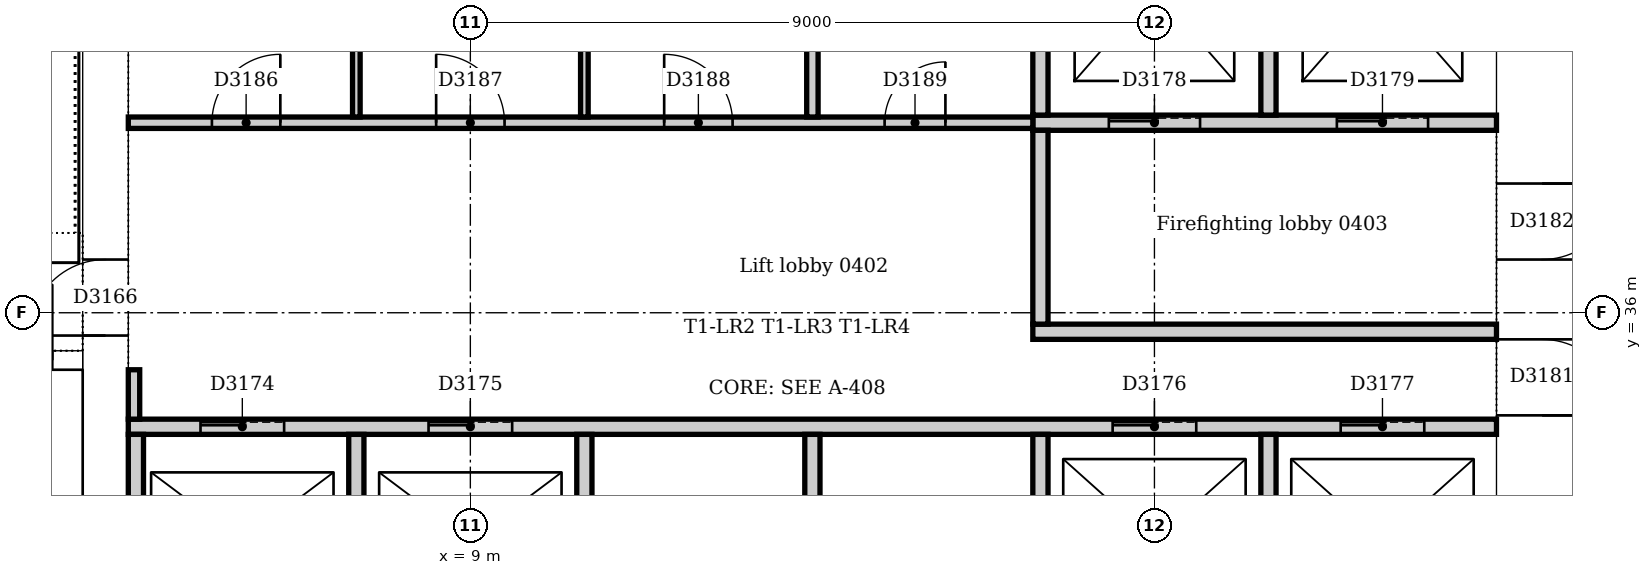
"""IFC4 building model, lengths in metres.
Left out: names, types, materials, properties, quantities, classifications, styles, units other than length and angle.
Written with IfcOpenShell. Run it as: python <this file> out.ifc"""

import sys

from ifc_helpers import new_model, si_unit, direction, frame, frame_2d, origin, place, context, subcontext, project, spatial, rectangle, extrude, element, fill, save


model = new_model("IFC4")
c1 = context("Model", 3, precision=1e-05, world=origin(), true_north=direction((0.0, 1.0)))
c2 = subcontext(c1, "Body", "Model", "MODEL_VIEW")
j1 = project(units=[si_unit("LENGTHUNIT", "METRE"), si_unit("PLANEANGLEUNIT", "RADIAN")], contexts=[c1])
p1 = place(None, origin())
s1 = spatial("IfcSite", under=j1, at=p1, CompositionType="ELEMENT")
p2 = place(p1, origin())
s2 = spatial("IfcBuilding", under=s1, at=p2, CompositionType="ELEMENT")
p3 = place(p2, frame((0.0, 0.0, 21.0)))
s3 = spatial("IfcBuildingStorey", under=s2, at=p3, CompositionType="ELEMENT", Elevation=21.0)
p4 = place(p3, frame((23.1, 31.5, 0.0), z_axis=(0.0, 0.0, 1.0), x_axis=(0.0, 1.0, 0.0)))
e1 = element("IfcWall", 1, at=p4, inside=s3, PredefinedType="SOLIDWALL", context=c2, shape_type="SweptSolid", body=[
    extrude(rectangle(XDim=10.5, YDim=1.2, at=frame_2d((5.25, 0.0))), origin(), (0.0, 0.0, 1.0), 5.0),
])
p5 = place(p4, frame((3.15, 0.0, 0.0)))
e2 = element("IfcOpeningElement", 2, at=p5, cuts=e1, PredefinedType="OPENING", context=c2, shape_type="SweptSolid", body=[
    extrude(rectangle(XDim=1.0, YDim=2.1, at=frame_2d((0.5, 1.05))), frame((0.0, 0.61, 0.0), z_axis=(0.0, -1.0, 0.0), x_axis=(1.0, 0.0, 0.0)), (0.0, 0.0, 1.0), 1.22),
])
p6 = place(p4, frame((5.2, 0.0, 0.0)))
e3 = element("IfcOpeningElement", 3, at=p6, cuts=e1, PredefinedType="OPENING", context=c2, shape_type="SweptSolid", body=[
    extrude(rectangle(XDim=1.0, YDim=2.1, at=frame_2d((0.5, 1.05))), frame((0.0, 0.61, 0.0), z_axis=(0.0, -1.0, 0.0), x_axis=(1.0, 0.0, 0.0)), (0.0, 0.0, 1.0), 1.22),
])
p7 = place(p3, frame((4.2, 42.0, 0.0), z_axis=(0.0, 0.0, 1.0), x_axis=(0.0, -1.0, 0.0)))
e4 = element("IfcWall", 4, at=p7, inside=s3, PredefinedType="SOLIDWALL", context=c2, shape_type="SweptSolid", body=[
    extrude(rectangle(XDim=10.5, YDim=0.6, at=frame_2d((5.25, 0.0))), origin(), (0.0, 0.0, 1.0), 5.0),
])
p8 = place(p7, frame((5.3, 0.0, 0.0)))
e5 = element("IfcOpeningElement", 5, at=p8, cuts=e4, PredefinedType="OPENING", context=c2, shape_type="SweptSolid", body=[
    extrude(rectangle(XDim=1.0, YDim=2.1, at=frame_2d((0.5, 1.05))), frame((0.0, 0.31, 0.0), z_axis=(0.0, -1.0, 0.0), x_axis=(1.0, 0.0, 0.0)), (0.0, 0.0, 1.0), 0.62),
])
p9 = place(p3, frame((0.36, 35.375, 0.0), z_axis=(0.0, 0.0, 1.0), x_axis=(1.0, 0.0, 0.0)))
e6 = element("IfcWall", 6, at=p9, inside=s3, PredefinedType="SOLIDWALL", context=c2, shape_type="SweptSolid", body=[
    extrude(rectangle(XDim=3.54, YDim=0.25, at=frame_2d((1.77, 0.0))), origin(), (0.0, 0.0, 1.0), 5.0),
])
p10 = place(p9, frame((2.14, 0.0, 0.0)))
e7 = element("IfcOpeningElement", 7, at=p10, cuts=e6, PredefinedType="OPENING", context=c2, shape_type="SweptSolid", body=[
    extrude(rectangle(XDim=1.0, YDim=2.1, at=frame_2d((0.5, 1.05))), frame((0.0, 0.135, 0.0), z_axis=(0.0, -1.0, 0.0), x_axis=(1.0, 0.0, 0.0)), (0.0, 0.0, 1.0), 0.27),
])
p11 = place(p3, frame((16.4, 35.75, 0.0), z_axis=(0.0, 0.0, 1.0), x_axis=(1.0, 0.0, 0.0)))
e8 = element("IfcWall", 8, at=p11, inside=s3, PredefinedType="PARTITIONING", context=c2, shape_type="SweptSolid", body=[
    extrude(rectangle(XDim=6.1, YDim=0.2, at=frame_2d((3.05, 0.0))), origin(), (0.0, 0.0, 1.0), 4.85),
])
p12 = place(p3, frame((16.4, 38.5, 0.0), z_axis=(0.0, 0.0, 1.0), x_axis=(1.0, 0.0, 0.0)))
e9 = element("IfcWall", 9, at=p12, inside=s3, PredefinedType="PARTITIONING", context=c2, shape_type="SweptSolid", body=[
    extrude(rectangle(XDim=6.1, YDim=0.2, at=frame_2d((3.05, 0.0))), origin(), (0.0, 0.0, 1.0), 4.85),
])
p13 = place(p12, frame((1.0, 0.0, 0.0)))
e10 = element("IfcOpeningElement", 10, at=p13, cuts=e9, PredefinedType="OPENING", context=c2, shape_type="SweptSolid", body=[
    extrude(rectangle(XDim=1.2, YDim=2.1, at=frame_2d((0.6, 1.05))), frame((0.0, 0.11, 0.0), z_axis=(0.0, -1.0, 0.0), x_axis=(1.0, 0.0, 0.0)), (0.0, 0.0, 1.0), 0.22),
])
p14 = place(p12, frame((4.0, 0.0, 0.0)))
e11 = element("IfcOpeningElement", 11, at=p14, cuts=e9, PredefinedType="OPENING", context=c2, shape_type="SweptSolid", body=[
    extrude(rectangle(XDim=1.2, YDim=2.1, at=frame_2d((0.6, 1.05))), frame((0.0, 0.11, 0.0), z_axis=(0.0, -1.0, 0.0), x_axis=(1.0, 0.0, 0.0)), (0.0, 0.0, 1.0), 0.22),
])
p15 = place(p3, frame((16.5, 35.85, 0.0), z_axis=(0.0, 0.0, 1.0), x_axis=(0.0, 1.0, 0.0)))
e12 = element("IfcWall", 12, at=p15, inside=s3, PredefinedType="PARTITIONING", context=c2, shape_type="SweptSolid", body=[
    extrude(rectangle(XDim=2.55, YDim=0.2, at=frame_2d((1.275, 0.0))), origin(), (0.0, 0.0, 1.0), 4.85),
])
p16 = place(p3, frame((4.5, 34.5, 0.0), z_axis=(0.0, 0.0, 1.0), x_axis=(1.0, 0.0, 0.0)))
e13 = element("IfcWall", 13, at=p16, inside=s3, PredefinedType="PARTITIONING", context=c2, shape_type="SweptSolid", body=[
    extrude(rectangle(XDim=18.0, YDim=0.2, at=frame_2d((9.0, 0.0))), origin(), (0.0, 0.0, 1.0), 4.85),
])
p17 = place(p16, frame((0.95, 0.0, 0.0)))
e14 = element("IfcOpeningElement", 14, at=p17, cuts=e13, PredefinedType="OPENING", context=c2, shape_type="SweptSolid", body=[
    extrude(rectangle(XDim=1.1, YDim=2.1, at=frame_2d((0.55, 1.05))), frame((0.0, 0.11, 0.0), z_axis=(0.0, -1.0, 0.0), x_axis=(1.0, 0.0, 0.0)), (0.0, 0.0, 1.0), 0.22),
])
p18 = place(p16, frame((3.95, 0.0, 0.0)))
e15 = element("IfcOpeningElement", 15, at=p18, cuts=e13, PredefinedType="OPENING", context=c2, shape_type="SweptSolid", body=[
    extrude(rectangle(XDim=1.1, YDim=2.1, at=frame_2d((0.55, 1.05))), frame((0.0, 0.11, 0.0), z_axis=(0.0, -1.0, 0.0), x_axis=(1.0, 0.0, 0.0)), (0.0, 0.0, 1.0), 0.22),
])
p19 = place(p16, frame((12.95, 0.0, 0.0)))
e16 = element("IfcOpeningElement", 16, at=p19, cuts=e13, PredefinedType="OPENING", context=c2, shape_type="SweptSolid", body=[
    extrude(rectangle(XDim=1.1, YDim=2.1, at=frame_2d((0.55, 1.05))), frame((0.0, 0.11, 0.0), z_axis=(0.0, -1.0, 0.0), x_axis=(1.0, 0.0, 0.0)), (0.0, 0.0, 1.0), 0.22),
])
p20 = place(p16, frame((15.95, 0.0, 0.0)))
e17 = element("IfcOpeningElement", 17, at=p20, cuts=e13, PredefinedType="OPENING", context=c2, shape_type="SweptSolid", body=[
    extrude(rectangle(XDim=1.1, YDim=2.1, at=frame_2d((0.55, 1.05))), frame((0.0, 0.11, 0.0), z_axis=(0.0, -1.0, 0.0), x_axis=(1.0, 0.0, 0.0)), (0.0, 0.0, 1.0), 0.22),
])
for number, where, z_axis, x_axis in (
    (18, (16.5, 38.6, 0.0), (0.0, 0.0, 1.0), (0.0, 1.0, 0.0)),
    (19, (19.5, 38.6, 0.0), (0.0, 0.0, 1.0), (0.0, 1.0, 0.0)),
):
    element("IfcWall", number, at=place(p3, frame(where, z_axis=z_axis, x_axis=x_axis)), inside=s3, PredefinedType="PARTITIONING", context=c2, shape_type="SweptSolid", body=[
        extrude(rectangle(XDim=3.4, YDim=0.2, at=frame_2d((1.7, 0.0))), origin(), (0.0, 0.0, 1.0), 4.85),
    ])
for number, where, z_axis, x_axis in (
    (20, (4.6, 31.75, 0.0), (0.0, 0.0, 1.0), (0.0, 1.0, 0.0)),
    (21, (7.5, 31.75, 0.0), (0.0, 0.0, 1.0), (0.0, 1.0, 0.0)),
    (22, (10.5, 31.75, 0.0), (0.0, 0.0, 1.0), (0.0, 1.0, 0.0)),
    (23, (13.5, 31.75, 0.0), (0.0, 0.0, 1.0), (0.0, 1.0, 0.0)),
    (24, (16.5, 31.75, 0.0), (0.0, 0.0, 1.0), (0.0, 1.0, 0.0)),
    (25, (19.5, 31.75, 0.0), (0.0, 0.0, 1.0), (0.0, 1.0, 0.0)),
):
    element("IfcWall", number, at=place(p3, frame(where, z_axis=z_axis, x_axis=x_axis)), inside=s3, PredefinedType="PARTITIONING", context=c2, shape_type="SweptSolid", body=[
        extrude(rectangle(XDim=2.65, YDim=0.2, at=frame_2d((1.325, 0.0))), origin(), (0.0, 0.0, 1.0), 4.85),
    ])
p21 = place(p3, frame((4.5, 38.5, 0.0), z_axis=(0.0, 0.0, 1.0), x_axis=(1.0, 0.0, 0.0)))
e26 = element("IfcWall", 26, at=p21, inside=s3, PredefinedType="PARTITIONING", context=c2, shape_type="SweptSolid", body=[
    extrude(rectangle(XDim=11.9, YDim=0.15, at=frame_2d((5.95, 0.0))), origin(), (0.0, 0.0, 1.0), 4.85),
])
p22 = place(p21, frame((1.1, 0.0, 0.0)))
e27 = element("IfcOpeningElement", 27, at=p22, cuts=e26, PredefinedType="OPENING", context=c2, shape_type="SweptSolid", body=[
    extrude(rectangle(XDim=0.9, YDim=2.1, at=frame_2d((0.45, 1.05))), frame((0.0, 0.085, 0.0), z_axis=(0.0, -1.0, 0.0), x_axis=(1.0, 0.0, 0.0)), (0.0, 0.0, 1.0), 0.17),
])
p23 = place(p21, frame((4.05, 0.0, 0.0)))
e28 = element("IfcOpeningElement", 28, at=p23, cuts=e26, PredefinedType="OPENING", context=c2, shape_type="SweptSolid", body=[
    extrude(rectangle(XDim=0.9, YDim=2.1, at=frame_2d((0.45, 1.05))), frame((0.0, 0.085, 0.0), z_axis=(0.0, -1.0, 0.0), x_axis=(1.0, 0.0, 0.0)), (0.0, 0.0, 1.0), 0.17),
])
p24 = place(p21, frame((7.05, 0.0, 0.0)))
e29 = element("IfcOpeningElement", 29, at=p24, cuts=e26, PredefinedType="OPENING", context=c2, shape_type="SweptSolid", body=[
    extrude(rectangle(XDim=0.9, YDim=2.1, at=frame_2d((0.45, 1.05))), frame((0.0, 0.085, 0.0), z_axis=(0.0, -1.0, 0.0), x_axis=(1.0, 0.0, 0.0)), (0.0, 0.0, 1.0), 0.17),
])
p25 = place(p21, frame((9.95, 0.0, 0.0)))
e30 = element("IfcOpeningElement", 30, at=p25, cuts=e26, PredefinedType="OPENING", context=c2, shape_type="SweptSolid", body=[
    extrude(rectangle(XDim=0.8, YDim=2.1, at=frame_2d((0.4, 1.05))), frame((0.0, 0.085, 0.0), z_axis=(0.0, -1.0, 0.0), x_axis=(1.0, 0.0, 0.0)), (0.0, 0.0, 1.0), 0.17),
])
p26 = place(p3, frame((4.575, 34.6, 0.0), z_axis=(0.0, 0.0, 1.0), x_axis=(0.0, 1.0, 0.0)))
e31 = element("IfcWall", 31, at=p26, inside=s3, PredefinedType="PARTITIONING", context=c2, shape_type="SweptSolid", body=[
    extrude(rectangle(XDim=0.65, YDim=0.15, at=frame_2d((0.325, 0.0))), origin(), (0.0, 0.0, 1.0), 4.85),
])
p27 = place(p3, frame((13.5, 38.575, 0.0), z_axis=(0.0, 0.0, 1.0), x_axis=(0.0, 1.0, 0.0)))
e32 = element("IfcWall", 32, at=p27, inside=s3, PredefinedType="PARTITIONING", context=c2, shape_type="SweptSolid", body=[
    extrude(rectangle(XDim=3.425, YDim=0.15, at=frame_2d((1.712, 0.0))), origin(), (0.0, 0.0, 1.0), 4.85),
])
for number, where, z_axis, x_axis in (
    (33, (7.5, 38.575, 0.0), (0.0, 0.0, 1.0), (0.0, 1.0, 0.0)),
    (34, (10.5, 38.575, 0.0), (0.0, 0.0, 1.0), (0.0, 1.0, 0.0)),
):
    element("IfcWall", number, at=place(p3, frame(where, z_axis=z_axis, x_axis=x_axis)), inside=s3, PredefinedType="PARTITIONING", context=c2, shape_type="SweptSolid", body=[
        extrude(rectangle(XDim=3.425, YDim=0.1, at=frame_2d((1.712, 0.0))), origin(), (0.0, 0.0, 1.0), 4.85),
    ])
p28 = place(p8, frame((1.0, 0.0, 0.0), z_axis=(0.0, 0.0, 1.0), x_axis=(-1.0, 0.0, 0.0)))
e35 = element("IfcDoor", 35, at=p28, inside=s3, OperationType="SINGLE_SWING_LEFT", PredefinedType="DOOR", context=c2, shape_type="SweptSolid", body=[
    extrude(rectangle(XDim=1.0, YDim=2.1, at=frame_2d((0.5, 1.05))), frame((0.0, 0.025, 0.0), z_axis=(0.0, -1.0, 0.0), x_axis=(1.0, 0.0, 0.0)), (0.0, 0.0, 1.0), 0.05),
])
fill(e5, e35)
p29 = place(p17, origin())
e36 = element("IfcDoor", 36, at=p29, inside=s3, OperationType="SLIDING_TO_LEFT", PredefinedType="DOOR", context=c2, shape_type="SweptSolid", body=[
    extrude(rectangle(XDim=1.1, YDim=2.1, at=frame_2d((0.55, 1.05))), frame((0.0, 0.025, 0.0), z_axis=(0.0, -1.0, 0.0), x_axis=(1.0, 0.0, 0.0)), (0.0, 0.0, 1.0), 0.05),
])
fill(e14, e36)
p30 = place(p18, origin())
e37 = element("IfcDoor", 37, at=p30, inside=s3, OperationType="SLIDING_TO_LEFT", PredefinedType="DOOR", context=c2, shape_type="SweptSolid", body=[
    extrude(rectangle(XDim=1.1, YDim=2.1, at=frame_2d((0.55, 1.05))), frame((0.0, 0.025, 0.0), z_axis=(0.0, -1.0, 0.0), x_axis=(1.0, 0.0, 0.0)), (0.0, 0.0, 1.0), 0.05),
])
fill(e15, e37)
p31 = place(p19, origin())
e38 = element("IfcDoor", 38, at=p31, inside=s3, OperationType="SLIDING_TO_LEFT", PredefinedType="DOOR", context=c2, shape_type="SweptSolid", body=[
    extrude(rectangle(XDim=1.1, YDim=2.1, at=frame_2d((0.55, 1.05))), frame((0.0, 0.025, 0.0), z_axis=(0.0, -1.0, 0.0), x_axis=(1.0, 0.0, 0.0)), (0.0, 0.0, 1.0), 0.05),
])
fill(e16, e38)
p32 = place(p20, origin())
e39 = element("IfcDoor", 39, at=p32, inside=s3, OperationType="SLIDING_TO_LEFT", PredefinedType="DOOR", context=c2, shape_type="SweptSolid", body=[
    extrude(rectangle(XDim=1.1, YDim=2.1, at=frame_2d((0.55, 1.05))), frame((0.0, 0.025, 0.0), z_axis=(0.0, -1.0, 0.0), x_axis=(1.0, 0.0, 0.0)), (0.0, 0.0, 1.0), 0.05),
])
fill(e17, e39)
p33 = place(p13, origin())
e40 = element("IfcDoor", 40, at=p33, inside=s3, OperationType="SLIDING_TO_LEFT", PredefinedType="DOOR", context=c2, shape_type="SweptSolid", body=[
    extrude(rectangle(XDim=1.2, YDim=2.1, at=frame_2d((0.6, 1.05))), frame((0.0, 0.025, 0.0), z_axis=(0.0, -1.0, 0.0), x_axis=(1.0, 0.0, 0.0)), (0.0, 0.0, 1.0), 0.05),
])
fill(e10, e40)
p34 = place(p14, origin())
e41 = element("IfcDoor", 41, at=p34, inside=s3, OperationType="SLIDING_TO_LEFT", PredefinedType="DOOR", context=c2, shape_type="SweptSolid", body=[
    extrude(rectangle(XDim=1.2, YDim=2.1, at=frame_2d((0.6, 1.05))), frame((0.0, 0.025, 0.0), z_axis=(0.0, -1.0, 0.0), x_axis=(1.0, 0.0, 0.0)), (0.0, 0.0, 1.0), 0.05),
])
fill(e11, e41)
p35 = place(p5, frame((1.0, 0.0, 0.0), z_axis=(0.0, 0.0, 1.0), x_axis=(-1.0, 0.0, 0.0)))
e42 = element("IfcDoor", 42, at=p35, inside=s3, OperationType="SINGLE_SWING_RIGHT", PredefinedType="DOOR", context=c2, shape_type="SweptSolid", body=[
    extrude(rectangle(XDim=1.0, YDim=2.1, at=frame_2d((0.5, 1.05))), frame((0.0, 0.025, 0.0), z_axis=(0.0, -1.0, 0.0), x_axis=(1.0, 0.0, 0.0)), (0.0, 0.0, 1.0), 0.05),
])
fill(e2, e42)
p36 = place(p6, frame((1.0, 0.0, 0.0), z_axis=(0.0, 0.0, 1.0), x_axis=(-1.0, 0.0, 0.0)))
e43 = element("IfcDoor", 43, at=p36, inside=s3, OperationType="SINGLE_SWING_LEFT", PredefinedType="DOOR", context=c2, shape_type="SweptSolid", body=[
    extrude(rectangle(XDim=1.0, YDim=2.1, at=frame_2d((0.5, 1.05))), frame((0.0, 0.025, 0.0), z_axis=(0.0, -1.0, 0.0), x_axis=(1.0, 0.0, 0.0)), (0.0, 0.0, 1.0), 0.05),
])
fill(e3, e43)
p37 = place(p22, origin())
e44 = element("IfcDoor", 44, at=p37, inside=s3, OperationType="SINGLE_SWING_RIGHT", PredefinedType="DOOR", context=c2, shape_type="SweptSolid", body=[
    extrude(rectangle(XDim=0.9, YDim=2.1, at=frame_2d((0.45, 1.05))), frame((0.0, 0.025, 0.0), z_axis=(0.0, -1.0, 0.0), x_axis=(1.0, 0.0, 0.0)), (0.0, 0.0, 1.0), 0.05),
])
fill(e27, e44)
p38 = place(p23, origin())
e45 = element("IfcDoor", 45, at=p38, inside=s3, OperationType="SINGLE_SWING_LEFT", PredefinedType="DOOR", context=c2, shape_type="SweptSolid", body=[
    extrude(rectangle(XDim=0.9, YDim=2.1, at=frame_2d((0.45, 1.05))), frame((0.0, 0.025, 0.0), z_axis=(0.0, -1.0, 0.0), x_axis=(1.0, 0.0, 0.0)), (0.0, 0.0, 1.0), 0.05),
])
fill(e28, e45)
p39 = place(p24, origin())
e46 = element("IfcDoor", 46, at=p39, inside=s3, OperationType="SINGLE_SWING_LEFT", PredefinedType="DOOR", context=c2, shape_type="SweptSolid", body=[
    extrude(rectangle(XDim=0.9, YDim=2.1, at=frame_2d((0.45, 1.05))), frame((0.0, 0.025, 0.0), z_axis=(0.0, -1.0, 0.0), x_axis=(1.0, 0.0, 0.0)), (0.0, 0.0, 1.0), 0.05),
])
fill(e29, e46)
p40 = place(p25, origin())
e47 = element("IfcDoor", 47, at=p40, inside=s3, OperationType="SINGLE_SWING_RIGHT", PredefinedType="DOOR", context=c2, shape_type="SweptSolid", body=[
    extrude(rectangle(XDim=0.8, YDim=2.1, at=frame_2d((0.4, 1.05))), frame((0.0, 0.025, 0.0), z_axis=(0.0, -1.0, 0.0), x_axis=(1.0, 0.0, 0.0)), (0.0, 0.0, 1.0), 0.05),
])
fill(e30, e47)
save(model, sys.argv[1])
